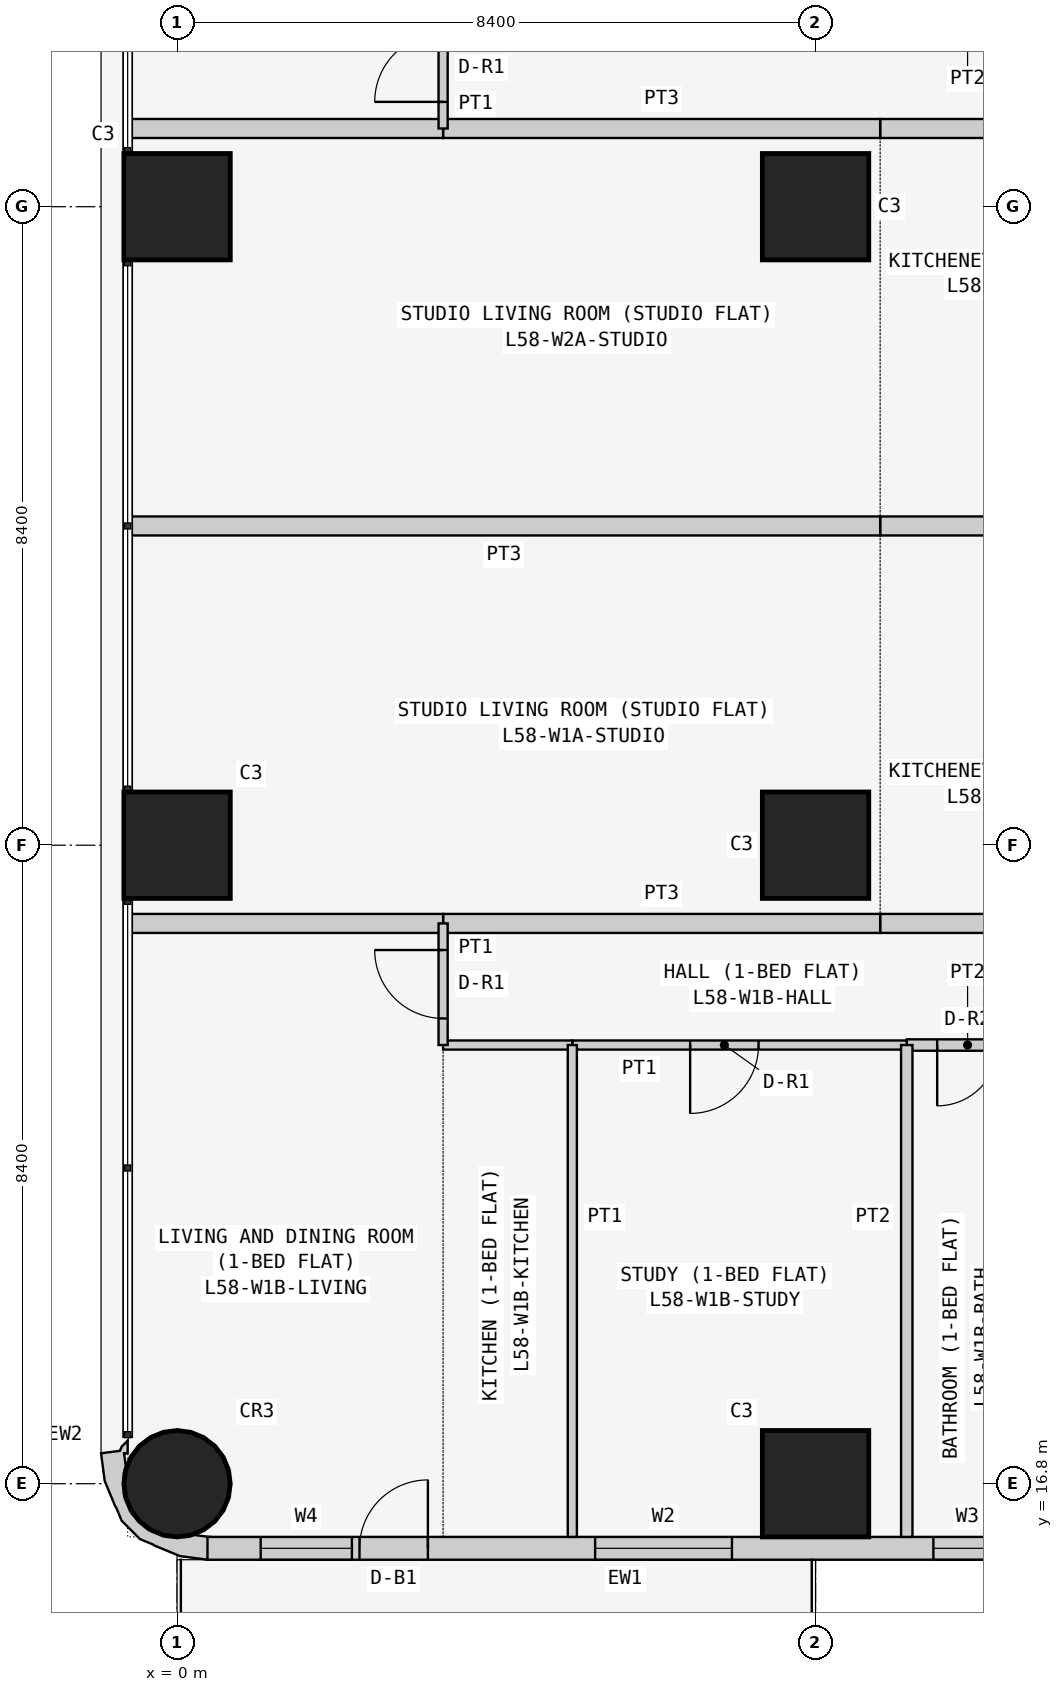
"""IFC4 building model, lengths in metres.
Left out: names, types, materials, properties, quantities, classifications, styles, units other than length and angle.
Written with IfcOpenShell. Run it as: python <this file> out.ifc"""

import sys

from ifc_helpers import new_model, si_unit, direction, frame, frame_2d, origin, origin_2d, place, context, subcontext, project, spatial, polyline, rectangle, circle, outline, extrude, element, fill, save


model = new_model("IFC4")
c1 = context("Model", 3, precision=1e-05, world=origin(), true_north=direction((0.0, 1.0)))
c2 = subcontext(c1, "Body", "Model", "MODEL_VIEW")
j1 = project(units=[si_unit("LENGTHUNIT", "METRE"), si_unit("PLANEANGLEUNIT", "RADIAN")], contexts=[c1])
p1 = place(None, origin())
s1 = spatial("IfcSite", under=j1, at=p1, CompositionType="ELEMENT")
p2 = place(p1, origin())
s2 = spatial("IfcBuilding", under=s1, at=p2, CompositionType="ELEMENT")
p3 = place(p2, frame((0.0, 0.0, 222.9)))
s3 = spatial("IfcBuildingStorey", under=s2, at=p3, CompositionType="ELEMENT", Elevation=222.9)
p4 = place(p3, frame((0.0, 16.8, 0.0), z_axis=(0.0, 0.0, 1.0), x_axis=(1.0, 0.0, 0.0)))
e1 = element("IfcColumn", 1, at=p4, inside=s3, PredefinedType="COLUMN", context=c2, shape_type="SweptSolid", body=[
    extrude(circle(Radius=0.7, at=origin_2d()), origin(), (0.0, 0.0, 1.0), 3.6),
])
for number, where, z_axis, x_axis in (
    (2, (0.0, 25.2, 0.0), (0.0, 0.0, 1.0), (1.0, 0.0, 0.0)),
    (3, (0.0, 33.6, 0.0), (0.0, 0.0, 1.0), (1.0, 0.0, 0.0)),
    (4, (8.4, 16.8, 0.0), (0.0, 0.0, 1.0), (1.0, 0.0, 0.0)),
    (5, (8.4, 25.2, 0.0), (0.0, 0.0, 1.0), (1.0, 0.0, 0.0)),
    (6, (8.4, 33.6, 0.0), (0.0, 0.0, 1.0), (1.0, 0.0, 0.0)),
):
    element("IfcColumn", number, at=place(p3, frame(where, z_axis=z_axis, x_axis=x_axis)), inside=s3, PredefinedType="COLUMN", context=c2, shape_type="SweptSolid", body=[
        extrude(rectangle(XDim=1.4, YDim=1.4, at=origin_2d()), origin(), (0.0, 0.0, 1.0), 3.6),
    ])
p5 = place(p3, frame((0.4, 15.95, 0.0), z_axis=(0.0, 0.0, 1.0), x_axis=(1.0, 0.0, 0.0)))
e7 = element("IfcWall", 7, at=p5, inside=s3, PredefinedType="SOLIDWALL", context=c2, shape_type="SweptSolid", body=[
    extrude(rectangle(XDim=15.7, YDim=0.3, at=frame_2d((7.85, 0.0))), origin(), (0.0, 0.0, 1.0), 3.45),
])
p6 = place(p5, frame((12.4, 0.0, 0.9)))
e8 = element("IfcOpeningElement", 8, at=p6, cuts=e7, PredefinedType="OPENING", context=c2, shape_type="SweptSolid", body=[
    extrude(rectangle(XDim=1.8, YDim=1.5, at=frame_2d((0.9, 0.75))), frame((0.0, 0.16, 0.0), z_axis=(0.0, -1.0, 0.0), x_axis=(1.0, 0.0, 0.0)), (0.0, 0.0, 1.0), 0.32),
])
p7 = place(p5, frame((9.55, 0.0, 1.5)))
e9 = element("IfcOpeningElement", 9, at=p7, cuts=e7, PredefinedType="OPENING", context=c2, shape_type="SweptSolid", body=[
    extrude(rectangle(XDim=0.9, YDim=0.7, at=frame_2d((0.45, 0.35))), frame((0.0, 0.16, 0.0), z_axis=(0.0, -1.0, 0.0), x_axis=(1.0, 0.0, 0.0)), (0.0, 0.0, 1.0), 0.32),
])
p8 = place(p5, frame((5.1, 0.0, 0.9)))
e10 = element("IfcOpeningElement", 10, at=p8, cuts=e7, PredefinedType="OPENING", context=c2, shape_type="SweptSolid", body=[
    extrude(rectangle(XDim=1.8, YDim=1.5, at=frame_2d((0.9, 0.75))), frame((0.0, 0.16, 0.0), z_axis=(0.0, -1.0, 0.0), x_axis=(1.0, 0.0, 0.0)), (0.0, 0.0, 1.0), 0.32),
])
p9 = place(p5, frame((2.0, 0.0, 0.0)))
e11 = element("IfcOpeningElement", 11, at=p9, cuts=e7, PredefinedType="OPENING", context=c2, shape_type="SweptSolid", body=[
    extrude(rectangle(XDim=0.9, YDim=2.4, at=frame_2d((0.45, 1.2))), frame((0.0, 0.16, 0.0), z_axis=(0.0, -1.0, 0.0), x_axis=(1.0, 0.0, 0.0)), (0.0, 0.0, 1.0), 0.32),
])
p10 = place(p5, frame((0.7, 0.0, 0.9)))
e12 = element("IfcOpeningElement", 12, at=p10, cuts=e7, PredefinedType="OPENING", context=c2, shape_type="SweptSolid", body=[
    extrude(rectangle(XDim=1.2, YDim=1.5, at=frame_2d((0.6, 0.75))), frame((0.0, 0.16, 0.0), z_axis=(0.0, -1.0, 0.0), x_axis=(1.0, 0.0, 0.0)), (0.0, 0.0, 1.0), 0.32),
])
p11 = place(p3, frame((-0.588, 17.312, 0.0), z_axis=(0.0, 0.0, 1.0), x_axis=(-0.898030234854, -0.439933741929, 0.0)))
e13 = element("IfcWall", 13, at=p11, inside=s3, PredefinedType="SOLIDWALL", context=c2, shape_type="SweptSolid", body=[
    extrude(outline(polyline([(-0.222, 1.793), (-0.39, 1.541), (-0.372, 1.532), (-0.195, 1.415), (-0.12, 1.41), (0.131, 1.287), (0.315, 1.078), (0.406, 0.814), (0.388, 0.536), (0.265, 0.285), (0.209, 0.236), (0.148, 0.053), (0.105, 0.074), (0.032, -0.076), (0.138, -0.039), (0.182, -0.0), (0.419, -0.08), (0.536, 0.266), (0.559, 0.631), (0.555, 0.651), (0.566, 0.836), (0.456, 1.159), (0.333, 1.298), (0.324, 1.316), (0.082, 1.591), (-0.222, 1.793)])), origin(), (0.0, 0.0, 1.0), 3.45),
])
for number, where, z_axis, x_axis in (
    (14, (9.25, 24.171, 0.0), (0.0, 0.0, 1.0), (1.0, 0.0, 0.0)),
    (15, (13.4, 29.4, 0.0), (0.0, 0.0, 1.0), (-1.0, 0.0, 0.0)),
):
    element("IfcWall", number, at=place(p3, frame(where, z_axis=z_axis, x_axis=x_axis)), inside=s3, PredefinedType="PARTITIONING", context=c2, shape_type="SweptSolid", body=[
        extrude(rectangle(XDim=4.15, YDim=0.25, at=frame_2d((2.075, 0.0))), origin(), (0.0, 0.0, 1.0), 3.45),
    ])
p12 = place(p3, frame((3.5, 24.171, 0.0), z_axis=(0.0, 0.0, 1.0), x_axis=(1.0, 0.0, 0.0)))
e16 = element("IfcWall", 16, at=p12, inside=s3, PredefinedType="PARTITIONING", context=c2, shape_type="SweptSolid", body=[
    extrude(rectangle(XDim=5.75, YDim=0.25, at=frame_2d((2.875, 0.0))), origin(), (0.0, 0.0, 1.0), 3.45),
])
p13 = place(p3, frame((-0.65, 24.171, 0.0), z_axis=(0.0, 0.0, 1.0), x_axis=(1.0, 0.0, 0.0)))
e17 = element("IfcWall", 17, at=p13, inside=s3, PredefinedType="PARTITIONING", context=c2, shape_type="SweptSolid", body=[
    extrude(rectangle(XDim=4.15, YDim=0.25, at=frame_2d((2.075, 0.0))), origin(), (0.0, 0.0, 1.0), 3.45),
])
p14 = place(p3, frame((9.25, 29.4, 0.0), z_axis=(0.0, 0.0, 1.0), x_axis=(-1.0, 0.0, 0.0)))
e18 = element("IfcWall", 18, at=p14, inside=s3, PredefinedType="PARTITIONING", context=c2, shape_type="SweptSolid", body=[
    extrude(rectangle(XDim=9.9, YDim=0.25, at=frame_2d((4.95, 0.0))), origin(), (0.0, 0.0, 1.0), 3.45),
])
p15 = place(p3, frame((9.6, 22.571, 0.0), z_axis=(0.0, 0.0, 1.0), x_axis=(1.0, 0.0, 0.0)))
e19 = element("IfcWall", 19, at=p15, inside=s3, PredefinedType="PARTITIONING", context=c2, shape_type="SweptSolid", body=[
    extrude(rectangle(XDim=1.6, YDim=0.15, at=frame_2d((0.8, 0.0))), origin(), (0.0, 0.0, 1.0), 3.45),
])
p16 = place(p15, frame((0.4, 0.0, 0.0)))
e20 = element("IfcOpeningElement", 20, at=p16, cuts=e19, PredefinedType="OPENING", context=c2, shape_type="SweptSolid", body=[
    extrude(rectangle(XDim=0.8, YDim=2.1, at=frame_2d((0.4, 1.05))), frame((0.0, 0.085, 0.0), z_axis=(0.0, -1.0, 0.0), x_axis=(1.0, 0.0, 0.0)), (0.0, 0.0, 1.0), 0.17),
])
p17 = place(p3, frame((5.2, 22.571, 0.0), z_axis=(0.0, 0.0, 1.0), x_axis=(1.0, 0.0, 0.0)))
e21 = element("IfcWall", 21, at=p17, inside=s3, PredefinedType="PARTITIONING", context=c2, shape_type="SweptSolid", body=[
    extrude(rectangle(XDim=4.4, YDim=0.12, at=frame_2d((2.2, 0.0))), origin(), (0.0, 0.0, 1.0), 3.45),
])
p18 = place(p17, frame((1.55, 0.0, 0.0)))
e22 = element("IfcOpeningElement", 22, at=p18, cuts=e21, PredefinedType="OPENING", context=c2, shape_type="SweptSolid", body=[
    extrude(rectangle(XDim=0.9, YDim=2.1, at=frame_2d((0.45, 1.05))), frame((0.0, 0.07, 0.0), z_axis=(0.0, -1.0, 0.0), x_axis=(1.0, 0.0, 0.0)), (0.0, 0.0, 1.0), 0.14),
])
p19 = place(p3, frame((3.5, 22.571, 0.0), z_axis=(0.0, 0.0, 1.0), x_axis=(1.0, 0.0, 0.0)))
e23 = element("IfcWall", 23, at=p19, inside=s3, PredefinedType="PARTITIONING", context=c2, shape_type="SweptSolid", body=[
    extrude(rectangle(XDim=1.7, YDim=0.12, at=frame_2d((0.85, 0.0))), origin(), (0.0, 0.0, 1.0), 3.45),
])
p20 = place(p3, frame((3.5, 24.171, 0.0), z_axis=(0.0, 0.0, 1.0), x_axis=(0.0, -1.0, 0.0)))
e24 = element("IfcWall", 24, at=p20, inside=s3, PredefinedType="PARTITIONING", context=c2, shape_type="SweptSolid", body=[
    extrude(rectangle(XDim=1.6, YDim=0.12, at=frame_2d((0.8, 0.0))), origin(), (0.0, 0.0, 1.0), 3.45),
])
p21 = place(p20, frame((0.35, 0.0, 0.0)))
e25 = element("IfcOpeningElement", 25, at=p21, cuts=e24, PredefinedType="OPENING", context=c2, shape_type="SweptSolid", body=[
    extrude(rectangle(XDim=0.9, YDim=2.1, at=frame_2d((0.45, 1.05))), frame((0.0, 0.07, 0.0), z_axis=(0.0, -1.0, 0.0), x_axis=(1.0, 0.0, 0.0)), (0.0, 0.0, 1.0), 0.14),
])
p22 = place(p3, frame((9.6, 22.571, 0.0), z_axis=(0.0, 0.0, 1.0), x_axis=(0.0, -1.0, 0.0)))
e26 = element("IfcWall", 26, at=p22, inside=s3, PredefinedType="PARTITIONING", context=c2, shape_type="SweptSolid", body=[
    extrude(rectangle(XDim=6.471, YDim=0.15, at=frame_2d((3.235, 0.0))), origin(), (0.0, 0.0, 1.0), 3.45),
])
p23 = place(p3, frame((5.2, 22.571, 0.0), z_axis=(0.0, 0.0, 1.0), x_axis=(0.0, -1.0, 0.0)))
e27 = element("IfcWall", 27, at=p23, inside=s3, PredefinedType="PARTITIONING", context=c2, shape_type="SweptSolid", body=[
    extrude(rectangle(XDim=6.471, YDim=0.12, at=frame_2d((3.235, 0.0))), origin(), (0.0, 0.0, 1.0), 3.45),
])
p24 = place(p3, frame((9.25, 34.629, 0.0), z_axis=(0.0, 0.0, 1.0), x_axis=(1.0, 0.0, 0.0)))
e28 = element("IfcWall", 28, at=p24, inside=s3, PredefinedType="PARTITIONING", context=c2, shape_type="SweptSolid", body=[
    extrude(rectangle(XDim=4.15, YDim=0.25, at=frame_2d((2.075, 0.0))), origin(), (0.0, 0.0, 1.0), 3.45),
])
p25 = place(p3, frame((3.5, 34.629, 0.0), z_axis=(0.0, 0.0, 1.0), x_axis=(1.0, 0.0, 0.0)))
e29 = element("IfcWall", 29, at=p25, inside=s3, PredefinedType="PARTITIONING", context=c2, shape_type="SweptSolid", body=[
    extrude(rectangle(XDim=5.75, YDim=0.25, at=frame_2d((2.875, 0.0))), origin(), (0.0, 0.0, 1.0), 3.45),
])
p26 = place(p3, frame((-0.65, 34.629, 0.0), z_axis=(0.0, 0.0, 1.0), x_axis=(1.0, 0.0, 0.0)))
e30 = element("IfcWall", 30, at=p26, inside=s3, PredefinedType="PARTITIONING", context=c2, shape_type="SweptSolid", body=[
    extrude(rectangle(XDim=4.15, YDim=0.25, at=frame_2d((2.075, 0.0))), origin(), (0.0, 0.0, 1.0), 3.45),
])
p27 = place(p3, frame((3.5, 34.629, 0.0), z_axis=(0.0, 0.0, 1.0), x_axis=(0.0, 1.0, 0.0)))
e31 = element("IfcWall", 31, at=p27, inside=s3, PredefinedType="PARTITIONING", context=c2, shape_type="SweptSolid", body=[
    extrude(rectangle(XDim=1.6, YDim=0.12, at=frame_2d((0.8, 0.0))), origin(), (0.0, 0.0, 1.0), 3.45),
])
p28 = place(p27, frame((0.35, 0.0, 0.0)))
e32 = element("IfcOpeningElement", 32, at=p28, cuts=e31, PredefinedType="OPENING", context=c2, shape_type="SweptSolid", body=[
    extrude(rectangle(XDim=0.9, YDim=2.1, at=frame_2d((0.45, 1.05))), frame((0.0, 0.07, 0.0), z_axis=(0.0, -1.0, 0.0), x_axis=(1.0, 0.0, 0.0)), (0.0, 0.0, 1.0), 0.14),
])
p29 = place(p7, origin())
e33 = element("IfcWindow", 33, at=p29, inside=s3, PartitioningType="SINGLE_PANEL", PredefinedType="WINDOW", context=c2, shape_type="SweptSolid", body=[
    extrude(rectangle(XDim=0.9, YDim=0.7, at=frame_2d((0.45, 0.35))), frame((0.0, 0.03, 0.0), z_axis=(0.0, -1.0, 0.0), x_axis=(1.0, 0.0, 0.0)), (0.0, 0.0, 1.0), 0.06),
])
fill(e9, e33)
p30 = place(p8, origin())
e34 = element("IfcWindow", 34, at=p30, inside=s3, PartitioningType="SINGLE_PANEL", PredefinedType="WINDOW", context=c2, shape_type="SweptSolid", body=[
    extrude(rectangle(XDim=1.8, YDim=1.5, at=frame_2d((0.9, 0.75))), frame((0.0, 0.03, 0.0), z_axis=(0.0, -1.0, 0.0), x_axis=(1.0, 0.0, 0.0)), (0.0, 0.0, 1.0), 0.06),
])
fill(e10, e34)
p31 = place(p9, origin())
e35 = element("IfcDoor", 35, at=p31, inside=s3, OperationType="SINGLE_SWING_RIGHT", PredefinedType="DOOR", context=c2, shape_type="SweptSolid", body=[
    extrude(rectangle(XDim=0.9, YDim=2.4, at=frame_2d((0.45, 1.2))), frame((0.0, 0.025, 0.0), z_axis=(0.0, -1.0, 0.0), x_axis=(1.0, 0.0, 0.0)), (0.0, 0.0, 1.0), 0.05),
])
fill(e11, e35)
p32 = place(p10, origin())
e36 = element("IfcWindow", 36, at=p32, inside=s3, PartitioningType="SINGLE_PANEL", PredefinedType="WINDOW", context=c2, shape_type="SweptSolid", body=[
    extrude(rectangle(XDim=1.2, YDim=1.5, at=frame_2d((0.6, 0.75))), frame((0.0, 0.03, 0.0), z_axis=(0.0, -1.0, 0.0), x_axis=(1.0, 0.0, 0.0)), (0.0, 0.0, 1.0), 0.06),
])
fill(e12, e36)
p33 = place(p16, frame((0.8, 0.0, 0.0), z_axis=(0.0, 0.0, 1.0), x_axis=(-1.0, 0.0, 0.0)))
e37 = element("IfcDoor", 37, at=p33, inside=s3, OperationType="SINGLE_SWING_RIGHT", PredefinedType="DOOR", context=c2, shape_type="SweptSolid", body=[
    extrude(rectangle(XDim=0.8, YDim=2.1, at=frame_2d((0.4, 1.05))), frame((0.0, 0.025, 0.0), z_axis=(0.0, -1.0, 0.0), x_axis=(1.0, 0.0, 0.0)), (0.0, 0.0, 1.0), 0.05),
])
fill(e20, e37)
p34 = place(p18, frame((0.9, 0.0, 0.0), z_axis=(0.0, 0.0, 1.0), x_axis=(-1.0, 0.0, 0.0)))
e38 = element("IfcDoor", 38, at=p34, inside=s3, OperationType="SINGLE_SWING_RIGHT", PredefinedType="DOOR", context=c2, shape_type="SweptSolid", body=[
    extrude(rectangle(XDim=0.9, YDim=2.1, at=frame_2d((0.45, 1.05))), frame((0.0, 0.025, 0.0), z_axis=(0.0, -1.0, 0.0), x_axis=(1.0, 0.0, 0.0)), (0.0, 0.0, 1.0), 0.05),
])
fill(e22, e38)
p35 = place(p21, frame((0.9, 0.0, 0.0), z_axis=(0.0, 0.0, 1.0), x_axis=(-1.0, 0.0, 0.0)))
e39 = element("IfcDoor", 39, at=p35, inside=s3, OperationType="SINGLE_SWING_RIGHT", PredefinedType="DOOR", context=c2, shape_type="SweptSolid", body=[
    extrude(rectangle(XDim=0.9, YDim=2.1, at=frame_2d((0.45, 1.05))), frame((0.0, 0.025, 0.0), z_axis=(0.0, -1.0, 0.0), x_axis=(1.0, 0.0, 0.0)), (0.0, 0.0, 1.0), 0.05),
])
fill(e25, e39)
p36 = place(p28, origin())
e40 = element("IfcDoor", 40, at=p36, inside=s3, OperationType="SINGLE_SWING_LEFT", PredefinedType="DOOR", context=c2, shape_type="SweptSolid", body=[
    extrude(rectangle(XDim=0.9, YDim=2.1, at=frame_2d((0.45, 1.05))), frame((0.0, 0.025, 0.0), z_axis=(0.0, -1.0, 0.0), x_axis=(1.0, 0.0, 0.0)), (0.0, 0.0, 1.0), 0.05),
])
fill(e32, e40)
save(model, sys.argv[1])
